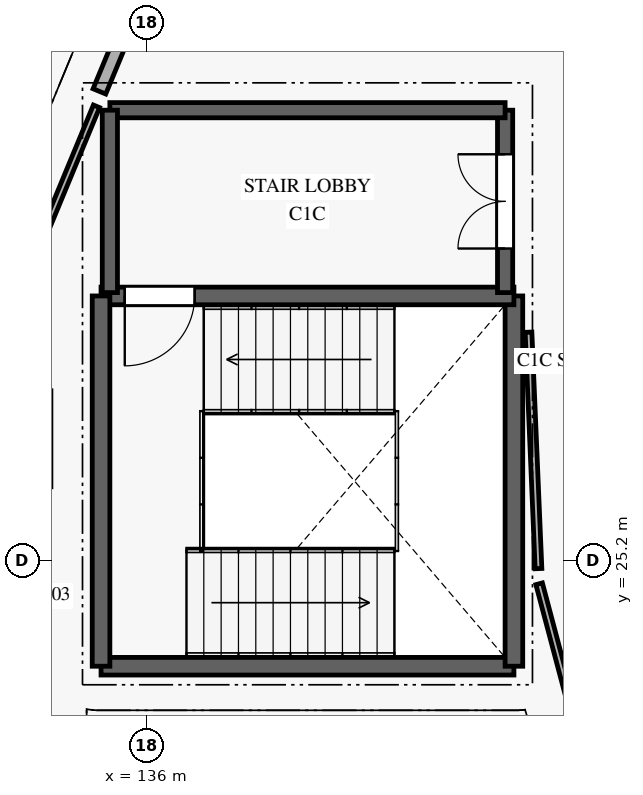
"""IFC4 building model, lengths in metres.
Left out: names, types, materials, properties, quantities, classifications, styles, units other than length and angle.
Written with IfcOpenShell. Run it as: python <this file> out.ifc"""

import sys

from ifc_helpers import new_model, si_unit, direction, frame, frame_2d, origin, place, context, subcontext, project, spatial, rectangle, extrude, element, fill, save


model = new_model("IFC4")
c1 = context("Model", 3, precision=1e-05, world=origin(), true_north=direction((0.0, 1.0)))
c2 = subcontext(c1, "Body", "Model", "MODEL_VIEW")
j1 = project(units=[si_unit("LENGTHUNIT", "METRE"), si_unit("PLANEANGLEUNIT", "RADIAN")], contexts=[c1])
p1 = place(None, origin())
s1 = spatial("IfcSite", under=j1, at=p1, CompositionType="ELEMENT")
p2 = place(p1, origin())
s2 = spatial("IfcBuilding", under=s1, at=p2, CompositionType="ELEMENT")
p3 = place(p2, frame((0.0, 0.0, 4.2)))
s3 = spatial("IfcBuildingStorey", under=s2, at=p3, CompositionType="ELEMENT", Elevation=4.2)
p4 = place(p3, frame((135.255, 23.455, 0.0), z_axis=(0.0, 0.0, 1.0), x_axis=(1.0, 0.0, 0.0)))
e1 = element("IfcWall", 1, at=p4, inside=s3, PredefinedType="SHEAR", context=c2, shape_type="SweptSolid", body=[
    extrude(rectangle(XDim=6.79, YDim=0.29, at=frame_2d((3.395, 0.0))), origin(), (0.0, 0.0, 1.0), 3.95),
])
p5 = place(p3, frame((142.045, 23.455, 0.0), z_axis=(0.0, 0.0, 1.0), x_axis=(0.0, 1.0, 0.0)))
e2 = element("IfcWall", 2, at=p5, inside=s3, PredefinedType="SHEAR", context=c2, shape_type="SweptSolid", body=[
    extrude(rectangle(XDim=6.09, YDim=0.29, at=frame_2d((3.045, 0.0))), origin(), (0.0, 0.0, 1.0), 3.95),
])
p6 = place(p3, frame((142.045, 29.545, 0.0), z_axis=(0.0, 0.0, 1.0), x_axis=(-1.0, 0.0, 0.0)))
e3 = element("IfcWall", 3, at=p6, inside=s3, PredefinedType="SHEAR", context=c2, shape_type="SweptSolid", body=[
    extrude(rectangle(XDim=6.79, YDim=0.29, at=frame_2d((3.395, 0.0))), origin(), (0.0, 0.0, 1.0), 3.95),
])
p7 = place(p6, frame((5.25, 0.0, 0.0)))
e4 = element("IfcOpeningElement", 4, at=p7, cuts=e3, PredefinedType="OPENING", context=c2, shape_type="SweptSolid", body=[
    extrude(rectangle(XDim=1.15, YDim=2.1, at=frame_2d((0.575, 1.05))), frame((0.0, 0.155, 0.0), z_axis=(0.0, -1.0, 0.0), x_axis=(1.0, 0.0, 0.0)), (0.0, 0.0, 1.0), 0.31),
])
p8 = place(p3, frame((135.255, 29.545, 0.0), z_axis=(0.0, 0.0, 1.0), x_axis=(0.0, -1.0, 0.0)))
e5 = element("IfcWall", 5, at=p8, inside=s3, PredefinedType="SHEAR", context=c2, shape_type="SweptSolid", body=[
    extrude(rectangle(XDim=6.09, YDim=0.29, at=frame_2d((3.045, 0.0))), origin(), (0.0, 0.0, 1.0), 3.95),
])
p9 = place(p3, frame((141.9, 29.6, 0.0), z_axis=(0.0, 0.0, 1.0), x_axis=(0.0, 1.0, 0.0)))
e6 = element("IfcWall", 6, at=p9, inside=s3, PredefinedType="SHEAR", context=c2, shape_type="SweptSolid", body=[
    extrude(rectangle(XDim=3.0, YDim=0.25, at=frame_2d((1.5, 0.0))), origin(), (0.0, 0.0, 1.0), 3.95),
])
p10 = place(p9, frame((0.725, 0.0, 0.0)))
e7 = element("IfcOpeningElement", 7, at=p10, cuts=e6, PredefinedType="OPENING", context=c2, shape_type="SweptSolid", body=[
    extrude(rectangle(XDim=1.55, YDim=2.15, at=frame_2d((0.775, 1.075))), frame((0.0, 0.135, 0.0), z_axis=(0.0, -1.0, 0.0), x_axis=(1.0, 0.0, 0.0)), (0.0, 0.0, 1.0), 0.27),
])
p11 = place(p3, frame((141.9, 32.6, 0.0), z_axis=(0.0, 0.0, 1.0), x_axis=(-1.0, 0.0, 0.0)))
e8 = element("IfcWall", 8, at=p11, inside=s3, PredefinedType="SHEAR", context=c2, shape_type="SweptSolid", body=[
    extrude(rectangle(XDim=6.5, YDim=0.25, at=frame_2d((3.25, 0.0))), origin(), (0.0, 0.0, 1.0), 3.95),
])
p12 = place(p3, frame((135.4, 32.6, 0.0), z_axis=(0.0, 0.0, 1.0), x_axis=(0.0, -1.0, 0.0)))
e9 = element("IfcWall", 9, at=p12, inside=s3, PredefinedType="SHEAR", context=c2, shape_type="SweptSolid", body=[
    extrude(rectangle(XDim=3.0, YDim=0.25, at=frame_2d((1.5, 0.0))), origin(), (0.0, 0.0, 1.0), 3.95),
])
p13 = place(p3, frame((135.18, 32.664, 0.0), z_axis=(0.0, 0.0, 1.0), x_axis=(-0.382629511238, -0.92390186553, 0.0)))
e10 = element("IfcWall", 10, at=p13, inside=s3, PredefinedType="PARTITIONING", context=c2, shape_type="SweptSolid", body=[
    extrude(rectangle(XDim=2.122, YDim=0.11, at=frame_2d((1.061, 0.0))), origin(), (0.0, 0.0, 1.0), 3.855),
])
p14 = place(p3, frame((143.277, 21.735, 0.0), z_axis=(0.0, 0.0, 1.0), x_axis=(-0.256822253657, 0.96645865407, 0.0)))
e11 = element("IfcWall", 11, at=p14, inside=s3, PredefinedType="PARTITIONING", context=c2, shape_type="SweptSolid", body=[
    extrude(rectangle(XDim=3.183, YDim=0.11, at=frame_2d((1.591, 0.0))), origin(), (0.0, 0.0, 1.0), 3.855),
])
p15 = place(p3, frame((142.449, 25.061, 0.0), z_axis=(0.0, 0.0, 1.0), x_axis=(-0.042220262727, 0.999108327167, 0.0)))
e12 = element("IfcWall", 12, at=p15, inside=s3, PredefinedType="PARTITIONING", context=c2, shape_type="SweptSolid", body=[
    extrude(rectangle(XDim=3.892, YDim=0.11, at=frame_2d((1.946, 0.0))), origin(), (0.0, 0.0, 1.0), 3.855),
])
p16 = place(p3, frame((135.228, 32.909, 0.0), z_axis=(0.0, 0.0, 1.0), x_axis=(0.382505902295, 0.923953047892, 0.0)))
e13 = element("IfcWall", 13, at=p16, inside=s3, PredefinedType="PARTITIONING", context=c2, shape_type="SweptSolid", body=[
    extrude(rectangle(XDim=2.565, YDim=0.225, at=frame_2d((1.283, 0.0))), origin(), (0.0, 0.0, 1.0), 3.855),
])
p17 = place(p7, origin())
e14 = element("IfcDoor", 14, at=p17, inside=s3, OperationType="SINGLE_SWING_RIGHT", PredefinedType="DOOR", context=c2, shape_type="SweptSolid", body=[
    extrude(rectangle(XDim=1.15, YDim=2.1, at=frame_2d((0.575, 1.05))), frame((0.0, 0.025, 0.0), z_axis=(0.0, -1.0, 0.0), x_axis=(1.0, 0.0, 0.0)), (0.0, 0.0, 1.0), 0.05),
])
fill(e4, e14)
p18 = place(p10, origin())
e15 = element("IfcDoor", 15, at=p18, inside=s3, OperationType="DOUBLE_DOOR_SINGLE_SWING", PredefinedType="DOOR", context=c2, shape_type="SweptSolid", body=[
    extrude(rectangle(XDim=1.55, YDim=2.15, at=frame_2d((0.775, 1.075))), frame((0.0, 0.025, 0.0), z_axis=(0.0, -1.0, 0.0), x_axis=(1.0, 0.0, 0.0)), (0.0, 0.0, 1.0), 0.05),
])
fill(e7, e15)
save(model, sys.argv[1])
